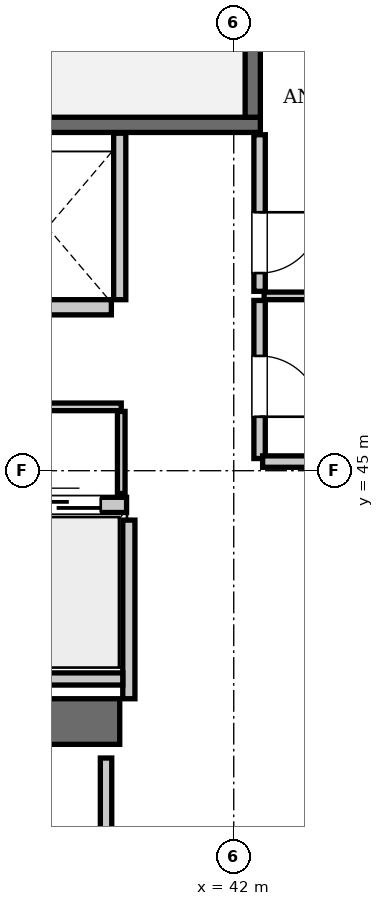
"""IFC4 building model, lengths in metres.
Left out: names, types, materials, properties, quantities, classifications, styles, units other than length and angle.
Written with IfcOpenShell. Run it as: python <this file> out.ifc"""

import sys

from ifc_helpers import new_model, si_unit, direction, frame, frame_2d, origin, place, context, subcontext, project, spatial, rectangle, extrude, element, fill, save


model = new_model("IFC4")
c1 = context("Model", 3, precision=1e-05, world=origin(), true_north=direction((0.0, 1.0)))
c2 = subcontext(c1, "Body", "Model", "MODEL_VIEW")
j1 = project(units=[si_unit("LENGTHUNIT", "METRE"), si_unit("PLANEANGLEUNIT", "RADIAN")], contexts=[c1])
p1 = place(None, origin())
s1 = spatial("IfcSite", under=j1, at=p1, CompositionType="ELEMENT")
p2 = place(p1, origin())
s2 = spatial("IfcBuilding", under=s1, at=p2, CompositionType="ELEMENT")
p3 = place(p2, frame((0.0, 0.0, 281.75)))
s3 = spatial("IfcBuildingStorey", under=s2, at=p3, CompositionType="ELEMENT", Elevation=281.75)
p4 = place(p3, frame((35.1, 41.7, 0.0), z_axis=(0.0, 0.0, 1.0), x_axis=(1.0, 0.0, 0.0)))
e1 = element("IfcWall", 1, at=p4, inside=s3, PredefinedType="SHEAR", context=c2, shape_type="SweptSolid", body=[
    extrude(rectangle(XDim=5.4, YDim=0.6, at=frame_2d((2.7, 0.0))), origin(), (0.0, 0.0, 1.0), 3.85),
])
p5 = place(p3, frame((33.25, 49.55, 0.0), z_axis=(0.0, 0.0, 1.0), x_axis=(1.0, 0.0, 0.0)))
e2 = element("IfcWall", 2, at=p5, inside=s3, PredefinedType="SOLIDWALL", context=c2, shape_type="SweptSolid", body=[
    extrude(rectangle(XDim=9.1, YDim=0.2, at=frame_2d((4.55, 0.0))), origin(), (0.0, 0.0, 1.0), 3.61),
])
p6 = place(p3, frame((42.25, 49.65, 0.0), z_axis=(0.0, 0.0, 1.0), x_axis=(0.0, 1.0, 0.0)))
e3 = element("IfcWall", 3, at=p6, inside=s3, PredefinedType="SOLIDWALL", context=c2, shape_type="SweptSolid", body=[
    extrude(rectangle(XDim=3.75, YDim=0.2, at=frame_2d((1.875, 0.0))), origin(), (0.0, 0.0, 1.0), 3.61),
])
p7 = place(p3, frame((38.91, 44.55, 0.0), z_axis=(0.0, 0.0, 1.0), x_axis=(1.0, 0.0, 0.0)))
e4 = element("IfcWall", 4, at=p7, inside=s3, PredefinedType="SOLIDWALL", context=c2, shape_type="SweptSolid", body=[
    extrude(rectangle(XDim=1.68, YDim=0.2, at=frame_2d((0.84, 0.0))), origin(), (0.0, 0.0, 1.0), 3.61),
])
p8 = place(p7, frame((0.34, 0.0, 0.0)))
e5 = element("IfcOpeningElement", 5, at=p8, cuts=e4, PredefinedType="OPENING", context=c2, shape_type="SweptSolid", body=[
    extrude(rectangle(XDim=1.0, YDim=2.15, at=frame_2d((0.5, 1.075))), frame((0.0, 0.11, 0.0), z_axis=(0.0, -1.0, 0.0), x_axis=(1.0, 0.0, 0.0)), (0.0, 0.0, 1.0), 0.22),
])
p9 = place(p3, frame((38.71, 47.15, 0.0), z_axis=(0.0, 0.0, 1.0), x_axis=(1.0, 0.0, 0.0)))
e6 = element("IfcWall", 6, at=p9, inside=s3, PredefinedType="SOLIDWALL", context=c2, shape_type="SweptSolid", body=[
    extrude(rectangle(XDim=1.68, YDim=0.2, at=frame_2d((0.84, 0.0))), origin(), (0.0, 0.0, 1.0), 3.61),
])
p10 = place(p3, frame((40.62, 42.0, 0.0), z_axis=(0.0, 0.0, 1.0), x_axis=(0.0, 1.0, 0.0)))
e7 = element("IfcWall", 7, at=p10, inside=s3, PredefinedType="SOLIDWALL", context=c2, shape_type="SweptSolid", body=[
    extrude(rectangle(XDim=2.35, YDim=0.16, at=frame_2d((1.175, 0.0))), origin(), (0.0, 0.0, 1.0), 3.61),
])
p11 = place(p3, frame((35.52, 42.26, 0.0), z_axis=(0.0, 0.0, 1.0), x_axis=(1.0, 0.0, 0.0)))
e8 = element("IfcWall", 8, at=p11, inside=s3, PredefinedType="SOLIDWALL", context=c2, shape_type="SweptSolid", body=[
    extrude(rectangle(XDim=5.02, YDim=0.16, at=frame_2d((2.51, 0.0))), origin(), (0.0, 0.0, 1.0), 3.61),
])
p12 = place(p3, frame((40.5, 47.25, 0.0), z_axis=(0.0, 0.0, 1.0), x_axis=(0.0, 1.0, 0.0)))
e9 = element("IfcWall", 9, at=p12, inside=s3, PredefinedType="SOLIDWALL", context=c2, shape_type="SweptSolid", body=[
    extrude(rectangle(XDim=2.19, YDim=0.16, at=frame_2d((1.095, 0.0))), origin(), (0.0, 0.0, 1.0), 3.61),
])
p13 = place(p3, frame((35.58, 45.84, 0.0), z_axis=(0.0, 0.0, 1.0), x_axis=(1.0, 0.0, 0.0)))
e10 = element("IfcWall", 10, at=p13, inside=s3, PredefinedType="PARTITIONING", context=c2, shape_type="SweptSolid", body=[
    extrude(rectangle(XDim=4.94, YDim=0.1, at=frame_2d((2.47, 0.0))), origin(), (0.0, 0.0, 1.0), 3.61),
])
p14 = place(p13, frame((1.8, 0.0, 0.0)))
e11 = element("IfcOpeningElement", 11, at=p14, cuts=e10, PredefinedType="OPENING", context=c2, shape_type="SweptSolid", body=[
    extrude(rectangle(XDim=0.8, YDim=2.05, at=frame_2d((0.4, 1.025))), frame((0.0, 0.06, 0.0), z_axis=(0.0, -1.0, 0.0), x_axis=(1.0, 0.0, 0.0)), (0.0, 0.0, 1.0), 0.12),
])
p15 = place(p3, frame((40.52, 44.7, 0.0), z_axis=(0.0, 0.0, 1.0), x_axis=(0.0, 1.0, 0.0)))
e12 = element("IfcWall", 12, at=p15, inside=s3, PredefinedType="PARTITIONING", context=c2, shape_type="SweptSolid", body=[
    extrude(rectangle(XDim=1.08, YDim=0.1, at=frame_2d((0.54, 0.0))), origin(), (0.0, 0.0, 1.0), 3.61),
])
p16 = place(p3, frame((42.34, 45.16, 0.0), z_axis=(0.0, 0.0, 1.0), x_axis=(0.0, 1.0, 0.0)))
e13 = element("IfcWall", 13, at=p16, inside=s3, PredefinedType="PARTITIONING", context=c2, shape_type="SweptSolid", body=[
    extrude(rectangle(XDim=2.08, YDim=0.15, at=frame_2d((1.04, 0.0))), origin(), (0.0, 0.0, 1.0), 3.61),
])
p17 = place(p16, frame((0.55, 0.0, 0.0)))
e14 = element("IfcOpeningElement", 14, at=p17, cuts=e13, PredefinedType="OPENING", context=c2, shape_type="SweptSolid", body=[
    extrude(rectangle(XDim=0.8, YDim=2.05, at=frame_2d((0.4, 1.025))), frame((0.0, 0.085, 0.0), z_axis=(0.0, -1.0, 0.0), x_axis=(1.0, 0.0, 0.0)), (0.0, 0.0, 1.0), 0.17),
])
p18 = place(p3, frame((42.34, 47.36, 0.0), z_axis=(0.0, 0.0, 1.0), x_axis=(0.0, 1.0, 0.0)))
e15 = element("IfcWall", 15, at=p18, inside=s3, PredefinedType="PARTITIONING", context=c2, shape_type="SweptSolid", body=[
    extrude(rectangle(XDim=2.06, YDim=0.15, at=frame_2d((1.03, 0.0))), origin(), (0.0, 0.0, 1.0), 3.61),
])
p19 = place(p18, frame((0.24, 0.0, 0.0)))
e16 = element("IfcOpeningElement", 16, at=p19, cuts=e15, PredefinedType="OPENING", context=c2, shape_type="SweptSolid", body=[
    extrude(rectangle(XDim=0.8, YDim=2.05, at=frame_2d((0.4, 1.025))), frame((0.0, 0.085, 0.0), z_axis=(0.0, -1.0, 0.0), x_axis=(1.0, 0.0, 0.0)), (0.0, 0.0, 1.0), 0.17),
])
p20 = place(p3, frame((42.4, 47.3, 0.0), z_axis=(0.0, 0.0, 1.0), x_axis=(1.0, 0.0, 0.0)))
e17 = element("IfcWall", 17, at=p20, inside=s3, PredefinedType="PARTITIONING", context=c2, shape_type="SweptSolid", body=[
    extrude(rectangle(XDim=3.1, YDim=0.1, at=frame_2d((1.55, 0.0))), origin(), (0.0, 0.0, 1.0), 3.61),
])
p21 = place(p3, frame((42.38, 45.12, 0.0), z_axis=(0.0, 0.0, 1.0), x_axis=(1.0, 0.0, 0.0)))
e18 = element("IfcWall", 18, at=p21, inside=s3, PredefinedType="PARTITIONING", context=c2, shape_type="SweptSolid", body=[
    extrude(rectangle(XDim=3.14, YDim=0.15, at=frame_2d((1.57, 0.0))), origin(), (0.0, 0.0, 1.0), 3.61),
])
p22 = place(p3, frame((40.32, 38.38, 0.0), z_axis=(0.0, 0.0, 1.0), x_axis=(0.0, 1.0, 0.0)))
e19 = element("IfcWall", 19, at=p22, inside=s3, PredefinedType="PARTITIONING", context=c2, shape_type="SweptSolid", body=[
    extrude(rectangle(XDim=2.84, YDim=0.15, at=frame_2d((1.42, 0.0))), origin(), (0.0, 0.0, 1.0), 3.61),
])
p23 = place(p8, origin())
e20 = element("IfcDoor", 20, at=p23, inside=s3, OperationType="SLIDING_TO_LEFT", PredefinedType="DOOR", context=c2, shape_type="SweptSolid", body=[
    extrude(rectangle(XDim=1.0, YDim=2.15, at=frame_2d((0.5, 1.075))), frame((0.0, 0.025, 0.0), z_axis=(0.0, -1.0, 0.0), x_axis=(1.0, 0.0, 0.0)), (0.0, 0.0, 1.0), 0.05),
])
fill(e5, e20)
p24 = place(p17, frame((0.8, 0.0, 0.0), z_axis=(0.0, 0.0, 1.0), x_axis=(-1.0, 0.0, 0.0)))
e21 = element("IfcDoor", 21, at=p24, inside=s3, OperationType="SINGLE_SWING_RIGHT", PredefinedType="DOOR", context=c2, shape_type="SweptSolid", body=[
    extrude(rectangle(XDim=0.8, YDim=2.05, at=frame_2d((0.4, 1.025))), frame((0.0, 0.025, 0.0), z_axis=(0.0, -1.0, 0.0), x_axis=(1.0, 0.0, 0.0)), (0.0, 0.0, 1.0), 0.05),
])
fill(e14, e21)
p25 = place(p19, frame((0.8, 0.0, 0.0), z_axis=(0.0, 0.0, 1.0), x_axis=(-1.0, 0.0, 0.0)))
e22 = element("IfcDoor", 22, at=p25, inside=s3, OperationType="SINGLE_SWING_LEFT", PredefinedType="DOOR", context=c2, shape_type="SweptSolid", body=[
    extrude(rectangle(XDim=0.8, YDim=2.05, at=frame_2d((0.4, 1.025))), frame((0.0, 0.025, 0.0), z_axis=(0.0, -1.0, 0.0), x_axis=(1.0, 0.0, 0.0)), (0.0, 0.0, 1.0), 0.05),
])
fill(e16, e22)
save(model, sys.argv[1])
